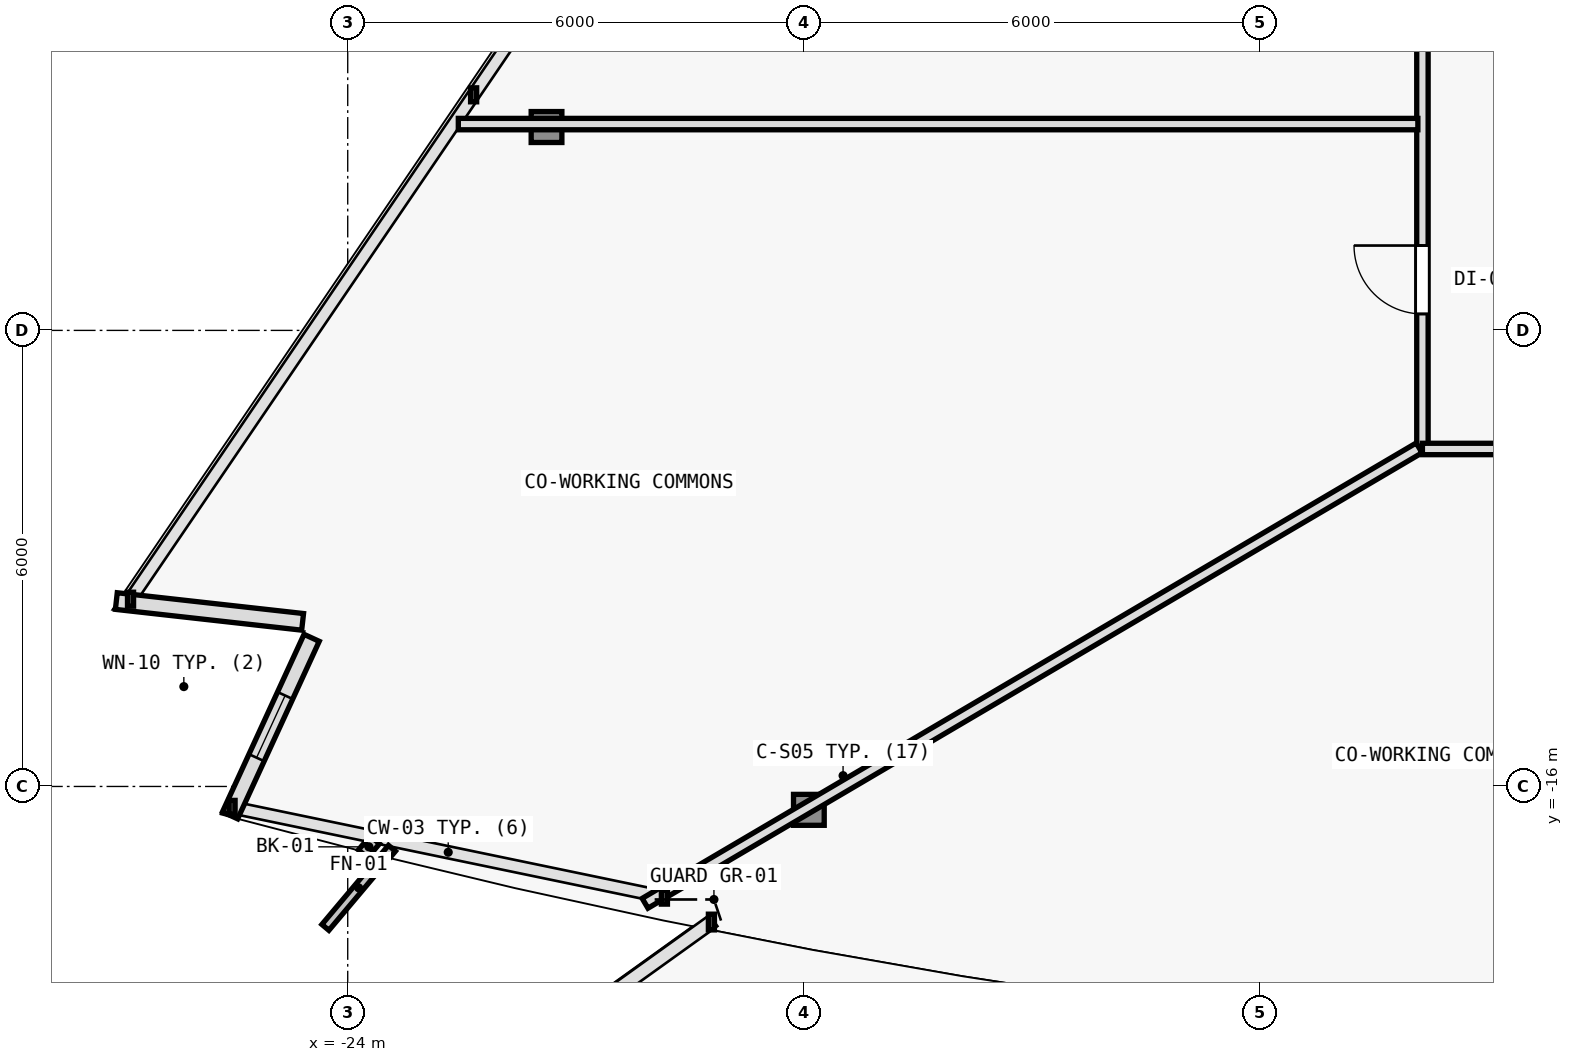
"""IFC4 building model, lengths in metres.
Left out: names, types, materials, properties, quantities, classifications, styles, units other than length and angle.
Written with IfcOpenShell. Run it as: python <this file> out.ifc"""

import sys

from ifc_helpers import new_model, si_unit, direction, frame, frame_2d, origin, origin_2d, place, context, subcontext, project, spatial, rectangle, i_section, extrude, element, fill, save


model = new_model("IFC4")
c1 = context("Model", 3, precision=1e-05, world=origin(), true_north=direction((0.0, 1.0)))
c2 = subcontext(c1, "Body", "Model", "MODEL_VIEW")
j1 = project(units=[si_unit("LENGTHUNIT", "METRE"), si_unit("PLANEANGLEUNIT", "RADIAN")], contexts=[c1])
p1 = place(None, origin())
s1 = spatial("IfcSite", under=j1, at=p1, CompositionType="ELEMENT")
p2 = place(p1, origin())
s2 = spatial("IfcBuilding", under=s1, at=p2, CompositionType="ELEMENT")
p3 = place(p2, frame((0.0, 0.0, 149.4)))
s3 = spatial("IfcBuildingStorey", under=s2, at=p3, CompositionType="ELEMENT", Elevation=149.4)
p4 = place(p3, frame((-17.933, -16.308, 0.006), z_axis=(0.020596292833, 0.033511459955, 0.999226087917), x_axis=(-0.851954850327, 0.523615252838, 0.0)))
e1 = element("IfcColumn", 1, at=p4, inside=s3, PredefinedType="COLUMN", context=c2, shape_type="SweptSolid", body=[
    extrude(i_section(OverallWidth=0.404, OverallDepth=0.407, WebThickness=0.017, FlangeThickness=0.028, FilletRadius=0.015, at=origin_2d()), origin(), (0.0, 0.0, 1.0), 3.592),
])
p5 = place(p3, frame((-21.384, -7.324, 0.006), z_axis=(0.025224163578, 0.021620711639, 0.999447990843), x_axis=(-0.650791373456, 0.759256602365, 0.0)))
e2 = element("IfcColumn", 2, at=p5, inside=s3, PredefinedType="COLUMN", context=c2, shape_type="SweptSolid", body=[
    extrude(i_section(OverallWidth=0.404, OverallDepth=0.407, WebThickness=0.017, FlangeThickness=0.028, FilletRadius=0.015, at=origin_2d()), origin(), (0.0, 0.0, 1.0), 3.591),
])
p6 = place(p3, frame((-24.594, -13.834, 0.0), z_axis=(0.0, 0.0, 1.0), x_axis=(-0.993823222634, 0.110974781609, 0.0)))
e3 = element("IfcWall", 3, at=p6, inside=s3, PredefinedType="SOLIDWALL", context=c2, shape_type="SweptSolid", body=[
    extrude(rectangle(XDim=2.466, YDim=0.22, at=frame_2d((1.233, 0.0))), origin(), (0.0, 0.0, 1.0), 3.35),
])
p7 = place(p3, frame((-25.548, -16.38, 0.0), z_axis=(0.0, 0.0, 1.0), x_axis=(0.417449299542, 0.908700215864, 0.0)))
e4 = element("IfcWall", 4, at=p7, inside=s3, PredefinedType="SOLIDWALL", context=c2, shape_type="SweptSolid", body=[
    extrude(rectangle(XDim=2.57, YDim=0.22, at=frame_2d((1.285, 0.0))), origin(), (0.0, 0.0, 1.0), 3.35),
])
p8 = place(p7, frame((0.835, 0.0, 0.62)))
e5 = element("IfcOpeningElement", 5, at=p8, cuts=e4, PredefinedType="OPENING", context=c2, shape_type="SweptSolid", body=[
    extrude(rectangle(XDim=0.9, YDim=1.6, at=frame_2d((0.45, 0.8))), frame((0.0, 0.12, 0.0), z_axis=(0.0, -1.0, 0.0), x_axis=(1.0, 0.0, 0.0)), (0.0, 0.0, 1.0), 0.24),
])
p9 = place(p3, frame((-9.86, -11.56, 0.0), z_axis=(0.0, 0.0, 1.0), x_axis=(0.0, 1.0, 0.0)))
e6 = element("IfcWall", 6, at=p9, inside=s3, PredefinedType="PARTITIONING", context=c2, shape_type="SweptSolid", body=[
    extrude(rectangle(XDim=19.986, YDim=0.15, at=frame_2d((9.993, 0.0))), origin(), (0.0, 0.0, 1.0), 2.775),
])
p10 = place(p9, frame((11.398, 0.0, 0.0)))
e7 = element("IfcOpeningElement", 7, at=p10, cuts=e6, PredefinedType="OPENING", context=c2, shape_type="SweptSolid", body=[
    extrude(rectangle(XDim=0.85, YDim=2.1, at=frame_2d((0.425, 1.05))), frame((0.0, 0.085, 0.0), z_axis=(0.0, -1.0, 0.0), x_axis=(1.0, 0.0, 0.0)), (0.0, 0.0, 1.0), 0.17),
])
p11 = place(p9, frame((10.015, 0.0, 0.0)))
e8 = element("IfcOpeningElement", 8, at=p11, cuts=e6, PredefinedType="OPENING", context=c2, shape_type="SweptSolid", body=[
    extrude(rectangle(XDim=0.85, YDim=2.1, at=frame_2d((0.425, 1.05))), frame((0.0, 0.085, 0.0), z_axis=(0.0, -1.0, 0.0), x_axis=(1.0, 0.0, 0.0)), (0.0, 0.0, 1.0), 0.17),
])
p12 = place(p9, frame((8.088, 0.0, 0.0)))
e9 = element("IfcOpeningElement", 9, at=p12, cuts=e6, PredefinedType="OPENING", context=c2, shape_type="SweptSolid", body=[
    extrude(rectangle(XDim=0.9, YDim=2.1, at=frame_2d((0.45, 1.05))), frame((0.0, 0.085, 0.0), z_axis=(0.0, -1.0, 0.0), x_axis=(1.0, 0.0, 0.0)), (0.0, 0.0, 1.0), 0.17),
])
p13 = place(p9, frame((5.324, 0.0, 0.0)))
e10 = element("IfcOpeningElement", 10, at=p13, cuts=e6, PredefinedType="OPENING", context=c2, shape_type="SweptSolid", body=[
    extrude(rectangle(XDim=0.9, YDim=2.1, at=frame_2d((0.45, 1.05))), frame((0.0, 0.085, 0.0), z_axis=(0.0, -1.0, 0.0), x_axis=(1.0, 0.0, 0.0)), (0.0, 0.0, 1.0), 0.17),
])
p14 = place(p9, frame((1.776, 0.0, 0.0)))
e11 = element("IfcOpeningElement", 11, at=p14, cuts=e6, PredefinedType="OPENING", context=c2, shape_type="SweptSolid", body=[
    extrude(rectangle(XDim=0.9, YDim=2.1, at=frame_2d((0.45, 1.05))), frame((0.0, 0.085, 0.0), z_axis=(0.0, -1.0, 0.0), x_axis=(1.0, 0.0, 0.0)), (0.0, 0.0, 1.0), 0.17),
])
p15 = place(p9, frame((13.266, 0.0, 0.0)))
e12 = element("IfcOpeningElement", 12, at=p15, cuts=e6, PredefinedType="OPENING", context=c2, shape_type="SweptSolid", body=[
    extrude(rectangle(XDim=0.9, YDim=2.1, at=frame_2d((0.45, 1.05))), frame((0.0, 0.085, 0.0), z_axis=(0.0, -1.0, 0.0), x_axis=(1.0, 0.0, 0.0)), (0.0, 0.0, 1.0), 0.17),
])
p16 = place(p3, frame((13.18, -11.56, 0.0), z_axis=(0.0, 0.0, 1.0), x_axis=(-1.0, 0.0, 0.0)))
e13 = element("IfcWall", 13, at=p16, inside=s3, PredefinedType="PARTITIONING", context=c2, shape_type="SweptSolid", body=[
    extrude(rectangle(XDim=23.04, YDim=0.15, at=frame_2d((11.52, 0.0))), origin(), (0.0, 0.0, 1.0), 2.775),
])
p17 = place(p16, frame((20.57, 0.0, 0.0)))
e14 = element("IfcOpeningElement", 14, at=p17, cuts=e13, PredefinedType="OPENING", context=c2, shape_type="SweptSolid", body=[
    extrude(rectangle(XDim=0.9, YDim=2.1, at=frame_2d((0.45, 1.05))), frame((0.0, 0.085, 0.0), z_axis=(0.0, -1.0, 0.0), x_axis=(1.0, 0.0, 0.0)), (0.0, 0.0, 1.0), 0.17),
])
p18 = place(p16, frame((10.563, 0.0, 0.0)))
e15 = element("IfcOpeningElement", 15, at=p18, cuts=e13, PredefinedType="OPENING", context=c2, shape_type="SweptSolid", body=[
    extrude(rectangle(XDim=0.9, YDim=2.1, at=frame_2d((0.45, 1.05))), frame((0.0, 0.085, 0.0), z_axis=(0.0, -1.0, 0.0), x_axis=(1.0, 0.0, 0.0)), (0.0, 0.0, 1.0), 0.17),
])
p19 = place(p3, frame((-9.903, -11.546, 0.0), z_axis=(0.0, 0.0, 1.0), x_axis=(-0.861918279973, -0.507047215403, 0.0)))
e16 = element("IfcWall", 16, at=p19, inside=s3, PredefinedType="PARTITIONING", context=c2, shape_type="SweptSolid", body=[
    extrude(rectangle(XDim=11.816, YDim=0.15, at=frame_2d((5.908, 0.0))), origin(), (0.0, 0.0, 1.0), 2.775),
])
p20 = place(p3, frame((-9.92, -7.286, 0.0), z_axis=(0.0, 0.0, 1.0), x_axis=(-1.0, 0.0, 0.0)))
e17 = element("IfcWall", 17, at=p20, inside=s3, PredefinedType="PARTITIONING", context=c2, shape_type="SweptSolid", body=[
    extrude(rectangle(XDim=12.625, YDim=0.15, at=frame_2d((6.312, 0.0))), origin(), (0.0, 0.0, 1.0), 2.775),
])
p21 = place(p8, origin())
e18 = element("IfcWindow", 18, at=p21, inside=s3, PartitioningType="SINGLE_PANEL", PredefinedType="WINDOW", context=c2, shape_type="SweptSolid", body=[
    extrude(rectangle(XDim=0.9, YDim=1.6, at=frame_2d((0.45, 0.8))), frame((0.0, 0.03, 0.0), z_axis=(0.0, -1.0, 0.0), x_axis=(1.0, 0.0, 0.0)), (0.0, 0.0, 1.0), 0.06),
])
fill(e5, e18)
p22 = place(p14, origin())
e19 = element("IfcDoor", 19, at=p22, inside=s3, OperationType="SINGLE_SWING_RIGHT", PredefinedType="DOOR", context=c2, shape_type="SweptSolid", body=[
    extrude(rectangle(XDim=0.9, YDim=2.1, at=frame_2d((0.45, 1.05))), frame((0.0, 0.025, 0.0), z_axis=(0.0, -1.0, 0.0), x_axis=(1.0, 0.0, 0.0)), (0.0, 0.0, 1.0), 0.05),
])
fill(e11, e19)
save(model, sys.argv[1])
